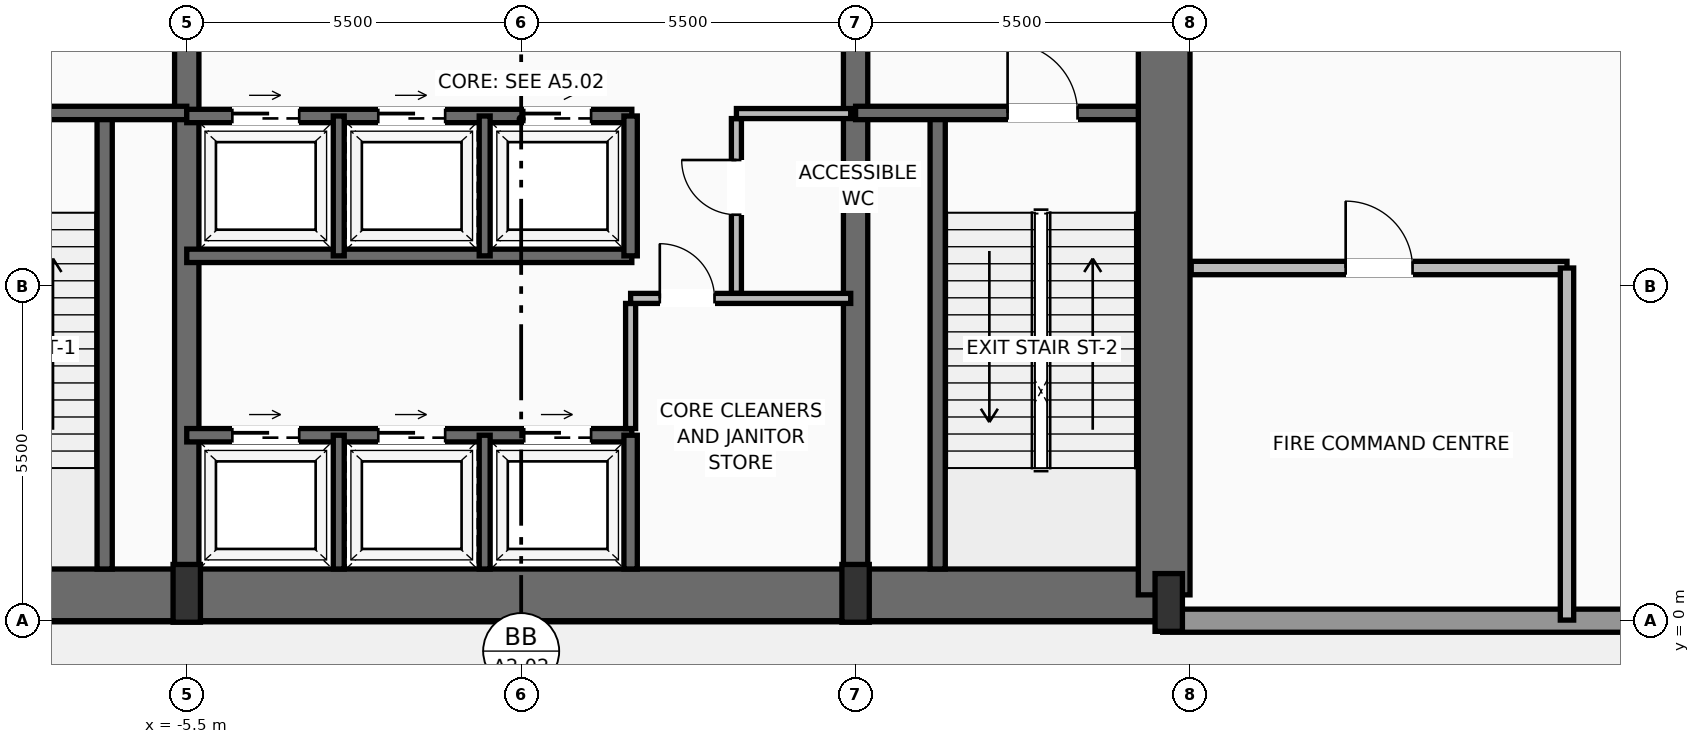
"""IFC4 building model, lengths in metres.
Left out: names, types, materials, properties, quantities, classifications, styles, units other than length and angle.
Written with IfcOpenShell. Run it as: python <this file> out.ifc"""

import sys

from ifc_helpers import new_model, si_unit, direction, frame, frame_2d, origin, origin_2d, place, context, subcontext, project, spatial, rectangle, extrude, source, transform, mapped, element, fill, save


model = new_model("IFC4")
c1 = context("Model", 3, precision=1e-05, world=origin(), true_north=direction((0.0, 1.0)))
c2 = subcontext(c1, "Body", "Model", "MODEL_VIEW")
j1 = project(units=[si_unit("LENGTHUNIT", "METRE"), si_unit("PLANEANGLEUNIT", "RADIAN")], contexts=[c1])
p1 = place(None, origin())
s1 = spatial("IfcSite", under=j1, at=p1, CompositionType="ELEMENT")
p2 = place(p1, origin())
s2 = spatial("IfcBuilding", under=s1, at=p2, CompositionType="ELEMENT")
p3 = place(p2, origin())
s3 = spatial("IfcBuildingStorey", under=s2, at=p3, CompositionType="ELEMENT", Elevation=0.0)
p4 = place(p3, frame((-10.65, 0.425, 0.0), z_axis=(0.0, 0.0, 1.0), x_axis=(1.0, 0.0, 0.0)))
e1 = element("IfcWall", 1, at=p4, inside=s3, PredefinedType="SHEAR", context=c2, shape_type="SweptSolid", body=[
    extrude(rectangle(XDim=21.3, YDim=0.85, at=frame_2d((10.65, 0.0))), origin(), (0.0, 0.0, 1.0), 5.15),
])
p5 = place(p3, frame((10.575, 0.425, 0.0), z_axis=(0.0, 0.0, 1.0), x_axis=(0.0, 1.0, 0.0)))
e2 = element("IfcWall", 2, at=p5, inside=s3, PredefinedType="SHEAR", context=c2, shape_type="SweptSolid", body=[
    extrude(rectangle(XDim=15.75, YDim=0.85, at=frame_2d((7.875, 0.0))), origin(), (0.0, 0.0, 1.0), 5.15),
])
p6 = place(p5, frame((9.125, 0.0, 0.0)))
e3 = element("IfcOpeningElement", 3, at=p6, cuts=e2, PredefinedType="OPENING", context=c2, shape_type="SweptSolid", body=[
    extrude(rectangle(XDim=1.1, YDim=2.2, at=frame_2d((0.55, 1.1))), frame((0.0, 0.435, 0.0), z_axis=(0.0, -1.0, 0.0), x_axis=(1.0, 0.0, 0.0)), (0.0, 0.0, 1.0), 0.87),
])
p7 = place(p3, frame((-5.5, 0.425, 0.0), z_axis=(0.0, 0.0, 1.0), x_axis=(0.0, 1.0, 0.0)))
e4 = element("IfcWall", 4, at=p7, inside=s3, PredefinedType="SHEAR", context=c2, shape_type="SweptSolid", body=[
    extrude(rectangle(XDim=15.75, YDim=0.4, at=frame_2d((7.875, 0.0))), origin(), (0.0, 0.0, 1.0), 5.15),
])
p8 = place(p7, frame((9.075, 0.0, 0.0)))
e5 = element("IfcOpeningElement", 5, at=p8, cuts=e4, PredefinedType="OPENING", context=c2, shape_type="SweptSolid", body=[
    extrude(rectangle(XDim=1.1, YDim=2.2, at=frame_2d((0.55, 1.1))), frame((0.0, 0.21, 0.0), z_axis=(0.0, -1.0, 0.0), x_axis=(1.0, 0.0, 0.0)), (0.0, 0.0, 1.0), 0.42),
])
p9 = place(p3, frame((5.5, 0.425, 0.0), z_axis=(0.0, 0.0, 1.0), x_axis=(0.0, 1.0, 0.0)))
e6 = element("IfcWall", 6, at=p9, inside=s3, PredefinedType="SHEAR", context=c2, shape_type="SweptSolid", body=[
    extrude(rectangle(XDim=15.75, YDim=0.4, at=frame_2d((7.875, 0.0))), origin(), (0.0, 0.0, 1.0), 5.15),
])
p10 = place(p9, frame((9.075, 0.0, 0.0)))
e7 = element("IfcOpeningElement", 7, at=p10, cuts=e6, PredefinedType="OPENING", context=c2, shape_type="SweptSolid", body=[
    extrude(rectangle(XDim=1.1, YDim=2.2, at=frame_2d((0.55, 1.1))), frame((0.0, 0.21, 0.0), z_axis=(0.0, -1.0, 0.0), x_axis=(1.0, 0.0, 0.0)), (0.0, 0.0, 1.0), 0.42),
])
m1 = source(origin(), c2, "Body", "SweptSolid", [
    extrude(rectangle(XDim=0.45, YDim=0.95, at=origin_2d()), origin(), (0.0, 0.0, 1.0), 5.5),
])
for number, where, z_axis, x_axis in (
    (8, (-5.5, 0.45, 0.0), (0.0, 0.0, 1.0), (1.0, 0.0, 0.0)),
    (9, (5.5, 0.45, 0.0), (0.0, 0.0, 1.0), (1.0, 0.0, 0.0)),
    (10, (10.65, 0.3, 0.0), (0.0, 0.0, 1.0), (1.0, 0.0, 0.0)),
):
    element("IfcColumn", number, at=place(p3, frame(where, z_axis=z_axis, x_axis=x_axis)), inside=s3, PredefinedType="PILASTER", context=c2, shape_type="MappedRepresentation", body=[
        mapped(m1, transform((0.0, 0.0, 0.0), scale=1.0)),
    ])
p11 = place(p3, frame((32.5, 0.0, 0.0), z_axis=(0.0, 0.0, 1.0), x_axis=(-1.0, 0.0, 0.0)))
e11 = element("IfcWall", 11, at=p11, inside=s3, PredefinedType="SOLIDWALL", context=c2, shape_type="SweptSolid", body=[
    extrude(rectangle(XDim=21.95, YDim=0.38, at=frame_2d((10.975, 0.0))), origin(), (0.0, 0.0, 1.0), 4.09),
])
p12 = place(p11, frame((12.05, 0.0, 0.0)))
e12 = element("IfcOpeningElement", 12, at=p12, cuts=e11, PredefinedType="OPENING", context=c2, shape_type="SweptSolid", body=[
    extrude(rectangle(XDim=1.9, YDim=2.3, at=frame_2d((0.95, 1.15))), frame((0.0, 0.2, 0.0), z_axis=(0.0, -1.0, 0.0), x_axis=(1.0, 0.0, 0.0)), (0.0, 0.0, 1.0), 0.4),
])
p13 = place(p3, frame((-6.85, 0.85, 0.0), z_axis=(0.0, 0.0, 1.0), x_axis=(0.0, 1.0, 0.0)))
e13 = element("IfcWall", 13, at=p13, inside=s3, PredefinedType="SOLIDWALL", context=c2, shape_type="SweptSolid", body=[
    extrude(rectangle(XDim=7.5, YDim=0.25, at=frame_2d((3.75, 0.0))), origin(), (0.0, 0.0, 1.0), 5.15),
])
p14 = place(p3, frame((-10.15, 8.35, 0.0), z_axis=(0.0, 0.0, 1.0), x_axis=(1.0, 0.0, 0.0)))
e14 = element("IfcWall", 14, at=p14, inside=s3, PredefinedType="SOLIDWALL", context=c2, shape_type="SweptSolid", body=[
    extrude(rectangle(XDim=4.65, YDim=0.22, at=frame_2d((2.325, 0.0))), origin(), (0.0, 0.0, 1.0), 5.15),
])
p15 = place(p14, frame((1.0, 0.0, 0.0)))
e15 = element("IfcOpeningElement", 15, at=p15, cuts=e14, PredefinedType="OPENING", context=c2, shape_type="SweptSolid", body=[
    extrude(rectangle(XDim=1.15, YDim=2.2, at=frame_2d((0.575, 1.1))), frame((0.0, 0.12, 0.0), z_axis=(0.0, -1.0, 0.0), x_axis=(1.0, 0.0, 0.0)), (0.0, 0.0, 1.0), 0.24),
])
p16 = place(p3, frame((6.85, 0.85, 0.0), z_axis=(0.0, 0.0, 1.0), x_axis=(0.0, 1.0, 0.0)))
e16 = element("IfcWall", 16, at=p16, inside=s3, PredefinedType="SOLIDWALL", context=c2, shape_type="SweptSolid", body=[
    extrude(rectangle(XDim=7.5, YDim=0.25, at=frame_2d((3.75, 0.0))), origin(), (0.0, 0.0, 1.0), 5.15),
])
p17 = place(p3, frame((5.5, 8.35, 0.0), z_axis=(0.0, 0.0, 1.0), x_axis=(1.0, 0.0, 0.0)))
e17 = element("IfcWall", 17, at=p17, inside=s3, PredefinedType="SOLIDWALL", context=c2, shape_type="SweptSolid", body=[
    extrude(rectangle(XDim=4.65, YDim=0.22, at=frame_2d((2.325, 0.0))), origin(), (0.0, 0.0, 1.0), 5.15),
])
p18 = place(p17, frame((2.5, 0.0, 0.0)))
e18 = element("IfcOpeningElement", 18, at=p18, cuts=e17, PredefinedType="OPENING", context=c2, shape_type="SweptSolid", body=[
    extrude(rectangle(XDim=1.15, YDim=2.2, at=frame_2d((0.575, 1.1))), frame((0.0, 0.12, 0.0), z_axis=(0.0, -1.0, 0.0), x_axis=(1.0, 0.0, 0.0)), (0.0, 0.0, 1.0), 0.24),
])
p19 = place(p3, frame((-5.5, 3.05, 0.0), z_axis=(0.0, 0.0, 1.0), x_axis=(1.0, 0.0, 0.0)))
e19 = element("IfcWall", 19, at=p19, inside=s3, PredefinedType="SOLIDWALL", context=c2, shape_type="SweptSolid", body=[
    extrude(rectangle(XDim=7.32, YDim=0.22, at=frame_2d((3.66, 0.0))), origin(), (0.0, 0.0, 1.0), 5.15),
])
p20 = place(p19, frame((0.75, 0.0, 0.0)))
e20 = element("IfcOpeningElement", 20, at=p20, cuts=e19, PredefinedType="OPENING", context=c2, shape_type="SweptSolid", body=[
    extrude(rectangle(XDim=1.1, YDim=2.2, at=frame_2d((0.55, 1.1))), frame((0.0, 0.12, 0.0), z_axis=(0.0, -1.0, 0.0), x_axis=(1.0, 0.0, 0.0)), (0.0, 0.0, 1.0), 0.24),
])
p21 = place(p19, frame((3.15, 0.0, 0.0)))
e21 = element("IfcOpeningElement", 21, at=p21, cuts=e19, PredefinedType="OPENING", context=c2, shape_type="SweptSolid", body=[
    extrude(rectangle(XDim=1.1, YDim=2.2, at=frame_2d((0.55, 1.1))), frame((0.0, 0.12, 0.0), z_axis=(0.0, -1.0, 0.0), x_axis=(1.0, 0.0, 0.0)), (0.0, 0.0, 1.0), 0.24),
])
p22 = place(p19, frame((5.55, 0.0, 0.0)))
e22 = element("IfcOpeningElement", 22, at=p22, cuts=e19, PredefinedType="OPENING", context=c2, shape_type="SweptSolid", body=[
    extrude(rectangle(XDim=1.1, YDim=2.2, at=frame_2d((0.55, 1.1))), frame((0.0, 0.12, 0.0), z_axis=(0.0, -1.0, 0.0), x_axis=(1.0, 0.0, 0.0)), (0.0, 0.0, 1.0), 0.24),
])
p23 = place(p3, frame((1.8, 0.85, 0.0), z_axis=(0.0, 0.0, 1.0), x_axis=(0.0, 1.0, 0.0)))
e23 = element("IfcWall", 23, at=p23, inside=s3, PredefinedType="SOLIDWALL", context=c2, shape_type="SweptSolid", body=[
    extrude(rectangle(XDim=2.2, YDim=0.22, at=frame_2d((1.1, 0.0))), origin(), (0.0, 0.0, 1.0), 5.15),
])
for number, where, z_axis, x_axis in (
    (24, (-3.0, 0.85, 0.0), (0.0, 0.0, 1.0), (0.0, 1.0, 0.0)),
    (25, (-0.6, 0.85, 0.0), (0.0, 0.0, 1.0), (0.0, 1.0, 0.0)),
):
    element("IfcWall", number, at=place(p3, frame(where, z_axis=z_axis, x_axis=x_axis)), inside=s3, PredefinedType="SOLIDWALL", context=c2, shape_type="SweptSolid", body=[
        extrude(rectangle(XDim=2.2, YDim=0.18, at=frame_2d((1.1, 0.0))), origin(), (0.0, 0.0, 1.0), 5.15),
    ])
p24 = place(p3, frame((1.8, 3.16, 0.0), z_axis=(0.0, 0.0, 1.0), x_axis=(0.0, 1.0, 0.0)))
e26 = element("IfcWall", 26, at=p24, inside=s3, PredefinedType="PARTITIONING", context=c2, shape_type="SweptSolid", body=[
    extrude(rectangle(XDim=2.058, YDim=0.165, at=frame_2d((1.029, 0.0))), origin(), (0.0, 0.0, 1.0), 5.142),
])
p25 = place(p3, frame((3.54, 5.383, 0.0), z_axis=(0.0, 0.0, 1.0), x_axis=(0.0, 1.0, 0.0)))
e27 = element("IfcWall", 27, at=p25, inside=s3, PredefinedType="PARTITIONING", context=c2, shape_type="SweptSolid", body=[
    extrude(rectangle(XDim=2.875, YDim=0.165, at=frame_2d((1.438, 0.0))), origin(), (0.0, 0.0, 1.0), 5.142),
])
p26 = place(p25, frame((1.294, 0.0, 0.0)))
e28 = element("IfcOpeningElement", 28, at=p26, cuts=e27, PredefinedType="OPENING", context=c2, shape_type="SweptSolid", body=[
    extrude(rectangle(XDim=0.9, YDim=2.1, at=frame_2d((0.45, 1.05))), frame((0.0, 0.093, 0.0), z_axis=(0.0, -1.0, 0.0), x_axis=(1.0, 0.0, 0.0)), (0.0, 0.0, 1.0), 0.185),
])
p27 = place(p3, frame((3.54, 8.34, 0.0), z_axis=(0.0, 0.0, 1.0), x_axis=(1.0, 0.0, 0.0)))
e29 = element("IfcWall", 29, at=p27, inside=s3, PredefinedType="PARTITIONING", context=c2, shape_type="SweptSolid", body=[
    extrude(rectangle(XDim=1.88, YDim=0.165, at=frame_2d((0.94, 0.0))), origin(), (0.0, 0.0, 1.0), 5.142),
])
p28 = place(p3, frame((1.8, 5.3, 0.0), z_axis=(0.0, 0.0, 1.0), x_axis=(1.0, 0.0, 0.0)))
e30 = element("IfcWall", 30, at=p28, inside=s3, PredefinedType="PARTITIONING", context=c2, shape_type="SweptSolid", body=[
    extrude(rectangle(XDim=3.62, YDim=0.165, at=frame_2d((1.81, 0.0))), origin(), (0.0, 0.0, 1.0), 5.142),
])
p29 = place(p28, frame((0.48, 0.0, 0.0)))
e31 = element("IfcOpeningElement", 31, at=p29, cuts=e30, PredefinedType="OPENING", context=c2, shape_type="SweptSolid", body=[
    extrude(rectangle(XDim=0.9, YDim=2.1, at=frame_2d((0.45, 1.05))), frame((0.0, 0.093, 0.0), z_axis=(0.0, -1.0, 0.0), x_axis=(1.0, 0.0, 0.0)), (0.0, 0.0, 1.0), 0.185),
])
p30 = place(p3, frame((-5.5, 6.0, 0.0), z_axis=(0.0, 0.0, 1.0), x_axis=(1.0, 0.0, 0.0)))
e32 = element("IfcWall", 32, at=p30, inside=s3, PredefinedType="SOLIDWALL", context=c2, shape_type="SweptSolid", body=[
    extrude(rectangle(XDim=7.32, YDim=0.22, at=frame_2d((3.66, 0.0))), origin(), (0.0, 0.0, 1.0), 5.15),
])
p31 = place(p3, frame((-5.5, 8.3, 0.0), z_axis=(0.0, 0.0, 1.0), x_axis=(1.0, 0.0, 0.0)))
e33 = element("IfcWall", 33, at=p31, inside=s3, PredefinedType="SOLIDWALL", context=c2, shape_type="SweptSolid", body=[
    extrude(rectangle(XDim=7.32, YDim=0.22, at=frame_2d((3.66, 0.0))), origin(), (0.0, 0.0, 1.0), 5.15),
])
p32 = place(p31, frame((0.75, 0.0, 0.0)))
e34 = element("IfcOpeningElement", 34, at=p32, cuts=e33, PredefinedType="OPENING", context=c2, shape_type="SweptSolid", body=[
    extrude(rectangle(XDim=1.1, YDim=2.2, at=frame_2d((0.55, 1.1))), frame((0.0, 0.12, 0.0), z_axis=(0.0, -1.0, 0.0), x_axis=(1.0, 0.0, 0.0)), (0.0, 0.0, 1.0), 0.24),
])
p33 = place(p31, frame((3.15, 0.0, 0.0)))
e35 = element("IfcOpeningElement", 35, at=p33, cuts=e33, PredefinedType="OPENING", context=c2, shape_type="SweptSolid", body=[
    extrude(rectangle(XDim=1.1, YDim=2.2, at=frame_2d((0.55, 1.1))), frame((0.0, 0.12, 0.0), z_axis=(0.0, -1.0, 0.0), x_axis=(1.0, 0.0, 0.0)), (0.0, 0.0, 1.0), 0.24),
])
p34 = place(p31, frame((5.55, 0.0, 0.0)))
e36 = element("IfcOpeningElement", 36, at=p34, cuts=e33, PredefinedType="OPENING", context=c2, shape_type="SweptSolid", body=[
    extrude(rectangle(XDim=1.1, YDim=2.2, at=frame_2d((0.55, 1.1))), frame((0.0, 0.12, 0.0), z_axis=(0.0, -1.0, 0.0), x_axis=(1.0, 0.0, 0.0)), (0.0, 0.0, 1.0), 0.24),
])
p35 = place(p3, frame((1.8, 6.0, 0.0), z_axis=(0.0, 0.0, 1.0), x_axis=(0.0, 1.0, 0.0)))
e37 = element("IfcWall", 37, at=p35, inside=s3, PredefinedType="SOLIDWALL", context=c2, shape_type="SweptSolid", body=[
    extrude(rectangle(XDim=2.3, YDim=0.22, at=frame_2d((1.15, 0.0))), origin(), (0.0, 0.0, 1.0), 5.15),
])
for number, where, z_axis, x_axis in (
    (38, (-3.0, 6.0, 0.0), (0.0, 0.0, 1.0), (0.0, 1.0, 0.0)),
    (39, (-0.6, 6.0, 0.0), (0.0, 0.0, 1.0), (0.0, 1.0, 0.0)),
):
    element("IfcWall", number, at=place(p3, frame(where, z_axis=z_axis, x_axis=x_axis)), inside=s3, PredefinedType="SOLIDWALL", context=c2, shape_type="SweptSolid", body=[
        extrude(rectangle(XDim=2.3, YDim=0.18, at=frame_2d((1.15, 0.0))), origin(), (0.0, 0.0, 1.0), 5.15),
    ])
p36 = place(p3, frame((11.02, 5.8, 0.0), z_axis=(0.0, 0.0, 1.0), x_axis=(1.0, 0.0, 0.0)))
e40 = element("IfcWall", 40, at=p36, inside=s3, PredefinedType="SOLIDWALL", context=c2, shape_type="SweptSolid", body=[
    extrude(rectangle(XDim=6.18, YDim=0.22, at=frame_2d((3.09, 0.0))), origin(), (0.0, 0.0, 1.0), 5.142),
])
p37 = place(p36, frame((2.54, 0.0, 0.0)))
e41 = element("IfcOpeningElement", 41, at=p37, cuts=e40, PredefinedType="OPENING", context=c2, shape_type="SweptSolid", body=[
    extrude(rectangle(XDim=1.1, YDim=2.2, at=frame_2d((0.55, 1.1))), frame((0.0, 0.12, 0.0), z_axis=(0.0, -1.0, 0.0), x_axis=(1.0, 0.0, 0.0)), (0.0, 0.0, 1.0), 0.24),
])
p38 = place(p3, frame((17.2, 0.01, 0.0), z_axis=(0.0, 0.0, 1.0), x_axis=(0.0, 1.0, 0.0)))
e42 = element("IfcWall", 42, at=p38, inside=s3, PredefinedType="SOLIDWALL", context=c2, shape_type="SweptSolid", body=[
    extrude(rectangle(XDim=5.79, YDim=0.22, at=frame_2d((2.895, 0.0))), origin(), (0.0, 0.0, 1.0), 4.102),
])
m2 = source(origin(), c2, "Body", "SweptSolid", [
    extrude(rectangle(XDim=1.15, YDim=2.2, at=frame_2d((0.575, 1.1))), frame((0.0, 0.025, 0.0), z_axis=(0.0, -1.0, 0.0), x_axis=(1.0, 0.0, 0.0)), (0.0, 0.0, 1.0), 0.05),
])
p39 = place(p18, origin())
e43 = element("IfcDoor", 43, at=p39, inside=s3, OperationType="SINGLE_SWING_LEFT", PredefinedType="DOOR", context=c2, shape_type="MappedRepresentation", body=[
    mapped(m2, transform((0.0, 0.0, 0.0), scale=1.0)),
])
fill(e18, e43)
m3 = source(origin(), c2, "Body", "SweptSolid", [
    extrude(rectangle(XDim=1.1, YDim=2.2, at=frame_2d((0.55, 1.1))), frame((0.0, 0.025, 0.0), z_axis=(0.0, -1.0, 0.0), x_axis=(1.0, 0.0, 0.0)), (0.0, 0.0, 1.0), 0.05),
])
p40 = place(p20, origin())
e44 = element("IfcDoor", 44, at=p40, inside=s3, OperationType="SLIDING_TO_RIGHT", PredefinedType="DOOR", context=c2, shape_type="MappedRepresentation", body=[
    mapped(m3, transform((0.0, 0.0, 0.0), scale=1.0)),
])
fill(e20, e44)
p41 = place(p21, origin())
e45 = element("IfcDoor", 45, at=p41, inside=s3, OperationType="SLIDING_TO_RIGHT", PredefinedType="DOOR", context=c2, shape_type="MappedRepresentation", body=[
    mapped(m3, transform((0.0, 0.0, 0.0), scale=1.0)),
])
fill(e21, e45)
p42 = place(p22, origin())
e46 = element("IfcDoor", 46, at=p42, inside=s3, OperationType="SLIDING_TO_RIGHT", PredefinedType="DOOR", context=c2, shape_type="MappedRepresentation", body=[
    mapped(m3, transform((0.0, 0.0, 0.0), scale=1.0)),
])
fill(e22, e46)
m4 = source(origin(), c2, "Body", "SweptSolid", [
    extrude(rectangle(XDim=0.9, YDim=2.1, at=frame_2d((0.45, 1.05))), frame((0.0, 0.025, 0.0), z_axis=(0.0, -1.0, 0.0), x_axis=(1.0, 0.0, 0.0)), (0.0, 0.0, 1.0), 0.05),
])
p43 = place(p29, origin())
e47 = element("IfcDoor", 47, at=p43, inside=s3, OperationType="SINGLE_SWING_LEFT", PredefinedType="DOOR", context=c2, shape_type="MappedRepresentation", body=[
    mapped(m4, transform((0.0, 0.0, 0.0), scale=1.0)),
])
fill(e31, e47)
p44 = place(p26, origin())
e48 = element("IfcDoor", 48, at=p44, inside=s3, OperationType="SINGLE_SWING_RIGHT", PredefinedType="DOOR", context=c2, shape_type="MappedRepresentation", body=[
    mapped(m4, transform((0.0, 0.0, 0.0), scale=1.0)),
])
fill(e28, e48)
p45 = place(p32, origin())
e49 = element("IfcDoor", 49, at=p45, inside=s3, OperationType="SLIDING_TO_LEFT", PredefinedType="DOOR", context=c2, shape_type="MappedRepresentation", body=[
    mapped(m3, transform((0.0, 0.0, 0.0), scale=1.0)),
])
fill(e34, e49)
p46 = place(p33, origin())
e50 = element("IfcDoor", 50, at=p46, inside=s3, OperationType="SLIDING_TO_LEFT", PredefinedType="DOOR", context=c2, shape_type="MappedRepresentation", body=[
    mapped(m3, transform((0.0, 0.0, 0.0), scale=1.0)),
])
fill(e35, e50)
p47 = place(p34, origin())
e51 = element("IfcDoor", 51, at=p47, inside=s3, OperationType="SLIDING_TO_LEFT", PredefinedType="DOOR", context=c2, shape_type="MappedRepresentation", body=[
    mapped(m3, transform((0.0, 0.0, 0.0), scale=1.0)),
])
fill(e36, e51)
m5 = source(origin(), c2, "Body", "SweptSolid", [
    extrude(rectangle(XDim=1.1, YDim=2.2, at=frame_2d((0.55, 1.1))), frame((0.0, 0.025, 0.0), z_axis=(0.0, -1.0, 0.0), x_axis=(1.0, 0.0, 0.0)), (0.0, 0.0, 1.0), 0.05),
])
p48 = place(p37, origin())
e52 = element("IfcDoor", 52, at=p48, inside=s3, OperationType="SINGLE_SWING_LEFT", PredefinedType="DOOR", context=c2, shape_type="MappedRepresentation", body=[
    mapped(m5, transform((0.0, 0.0, 0.0), scale=1.0)),
])
fill(e41, e52)
save(model, sys.argv[1])
